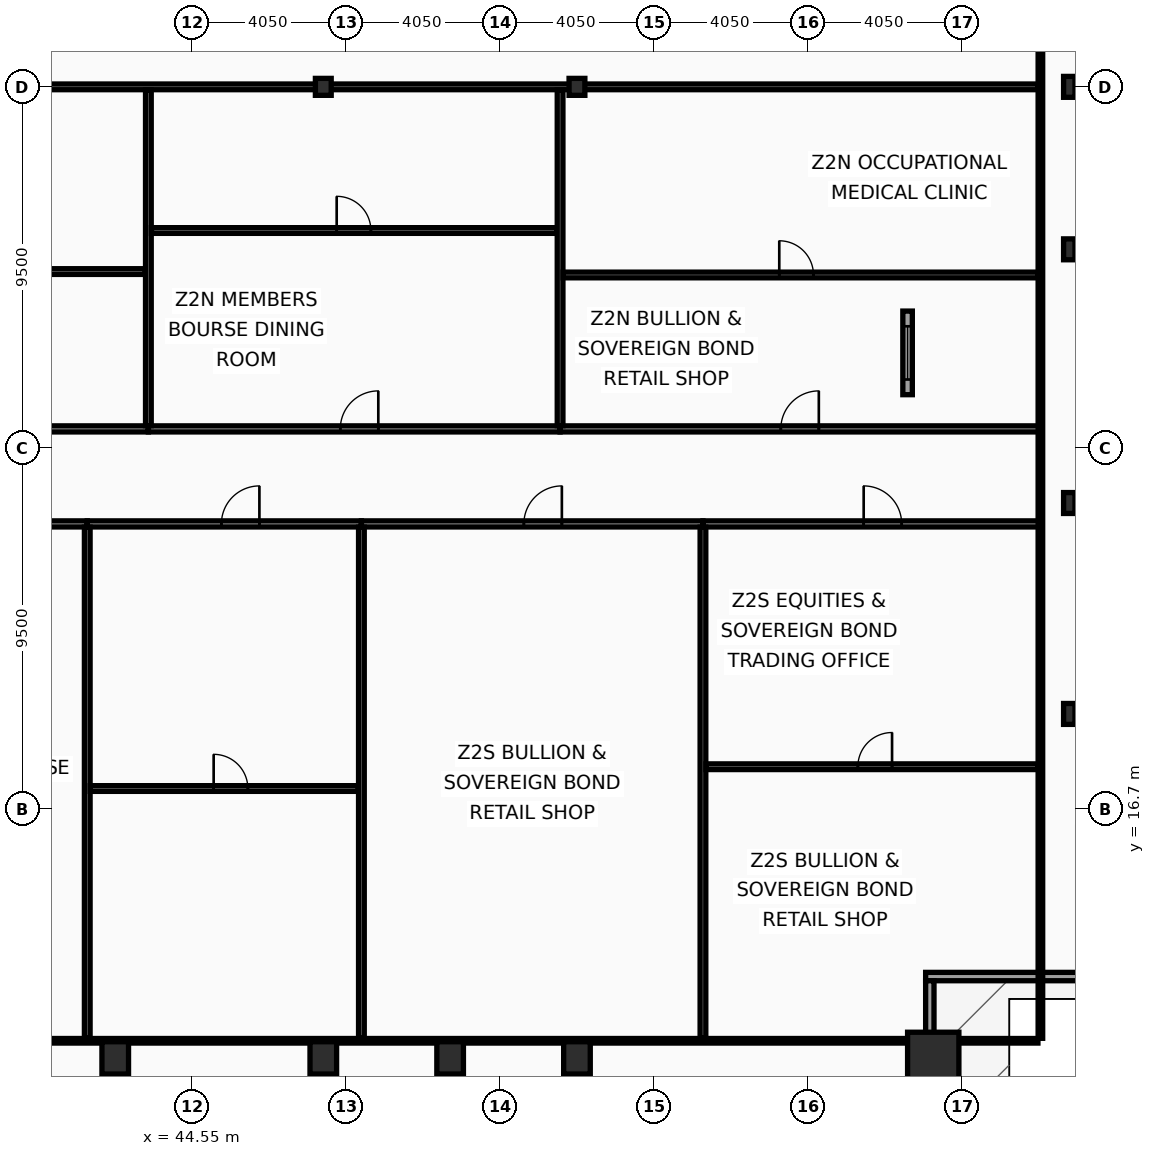
"""IFC4 building model, lengths in metres.
Left out: names, types, materials, properties, quantities, classifications, styles, units other than length and angle.
Written with IfcOpenShell. Run it as: python <this file> out.ifc"""

import sys

from ifc_helpers import new_model, si_unit, direction, frame, frame_2d, origin, origin_2d, place, context, subcontext, project, spatial, rectangle, hollow_rectangle, i_section, extrude, element, fill, save


model = new_model("IFC4")
c1 = context("Model", 3, precision=1e-05, world=origin(), true_north=direction((0.0, 1.0)))
c2 = subcontext(c1, "Body", "Model", "MODEL_VIEW")
j1 = project(units=[si_unit("LENGTHUNIT", "METRE"), si_unit("PLANEANGLEUNIT", "RADIAN")], contexts=[c1])
p1 = place(None, origin())
s1 = spatial("IfcSite", under=j1, at=p1, CompositionType="ELEMENT")
p2 = place(p1, origin())
s2 = spatial("IfcBuilding", under=s1, at=p2, CompositionType="ELEMENT")
p3 = place(p2, frame((0.0, 0.0, 136.2)))
s3 = spatial("IfcBuildingStorey", under=s2, at=p3, CompositionType="ELEMENT", Elevation=136.2)
p4 = place(p3, frame((64.05, 10.15, 0.0), z_axis=(0.0, 0.0, 1.0), x_axis=(1.0, 0.0, 0.0)))
e1 = element("IfcColumn", 1, at=p4, inside=s3, PredefinedType="COLUMN", context=c2, shape_type="SweptSolid", body=[
    extrude(hollow_rectangle(XDim=1.35, YDim=1.35, WallThickness=0.065, at=origin_2d()), origin(), (0.0, 0.0, 1.0), 3.6),
])
for number, where, z_axis, x_axis in (
    (2, (42.525, 10.15, 0.0), (0.0, 0.0, 1.0), (1.0, 0.0, 0.0)),
    (3, (48.0, 10.15, 0.0), (0.0, 0.0, 1.0), (1.0, 0.0, 0.0)),
    (4, (51.337, 10.15, 0.0), (0.0, 0.0, 1.0), (1.0, 0.0, 0.0)),
    (5, (54.675, 10.15, 0.0), (0.0, 0.0, 1.0), (1.0, 0.0, 0.0)),
):
    element("IfcColumn", number, at=place(p3, frame(where, z_axis=z_axis, x_axis=x_axis)), inside=s3, PredefinedType="COLUMN", context=c2, shape_type="SweptSolid", body=[
        extrude(hollow_rectangle(XDim=0.7, YDim=0.85, WallThickness=0.05, at=origin_2d()), origin(), (0.0, 0.0, 1.0), 3.6),
    ])
for number, where, z_axis, x_axis in (
    (6, (67.63, 19.2, 0.0), (0.0, 0.0, 1.0), (1.0, 0.0, 0.0)),
    (7, (67.63, 24.75, 0.0), (0.0, 0.0, 1.0), (1.0, 0.0, 0.0)),
    (8, (67.63, 31.425, 0.0), (0.0, 0.0, 1.0), (1.0, 0.0, 0.0)),
    (9, (67.63, 35.7, 0.0), (0.0, 0.0, 1.0), (1.0, 0.0, 0.0)),
):
    element("IfcColumn", number, at=place(p3, frame(where, z_axis=z_axis, x_axis=x_axis)), inside=s3, PredefinedType="COLUMN", context=c2, shape_type="SweptSolid", body=[
        extrude(i_section(OverallWidth=0.3, OverallDepth=0.55, WebThickness=0.015, FlangeThickness=0.029, at=origin_2d()), origin(), (0.0, 0.0, 1.0), 3.6),
    ])
for number, where, z_axis, x_axis in (
    (10, (48.0, 35.7, 0.0), (0.0, 0.0, 1.0), (1.0, 0.0, 0.0)),
    (11, (54.675, 35.7, 0.0), (0.0, 0.0, 1.0), (1.0, 0.0, 0.0)),
):
    element("IfcColumn", number, at=place(p3, frame(where, z_axis=z_axis, x_axis=x_axis)), inside=s3, PredefinedType="COLUMN", context=c2, shape_type="SweptSolid", body=[
        extrude(i_section(OverallWidth=0.416, OverallDepth=0.446, WebThickness=0.039, FlangeThickness=0.063, at=origin_2d()), origin(), (0.0, 0.0, 1.0), 3.6),
    ])
p5 = place(p3, frame((68.07, 12.29, 0.0), z_axis=(0.0, 0.0, 1.0), x_axis=(-1.0, 0.0, 0.0)))
e12 = element("IfcWall", 12, at=p5, inside=s3, PredefinedType="SOLIDWALL", context=c2, shape_type="SweptSolid", body=[
    extrude(rectangle(XDim=4.22, YDim=0.22, at=frame_2d((2.11, 0.0))), origin(), (0.0, 0.0, 1.0), 2.83),
])
p6 = place(p3, frame((63.96, 12.18, 0.0), z_axis=(0.0, 0.0, 1.0), x_axis=(0.0, -1.0, 0.0)))
e13 = element("IfcWall", 13, at=p6, inside=s3, PredefinedType="SOLIDWALL", context=c2, shape_type="SweptSolid", body=[
    extrude(rectangle(XDim=3.91, YDim=0.22, at=frame_2d((1.955, 0.0))), origin(), (0.0, 0.0, 1.0), 2.83),
])
p7 = place(p3, frame((63.375, 27.6, 0.0), z_axis=(0.0, 0.0, 1.0), x_axis=(0.0, 1.0, 0.0)))
e14 = element("IfcWall", 14, at=p7, inside=s3, PredefinedType="PARAPET", context=c2, shape_type="SweptSolid", body=[
    extrude(rectangle(XDim=2.2, YDim=0.25, at=frame_2d((1.1, 0.0))), origin(), (0.0, 0.0, 1.0), 0.88),
])
p8 = place(p7, frame((0.4, 0.0, 0.16)))
e15 = element("IfcOpeningElement", 15, at=p8, cuts=e14, PredefinedType="OPENING", context=c2, shape_type="SweptSolid", body=[
    extrude(rectangle(XDim=1.4, YDim=0.5, at=frame_2d((0.7, 0.25))), frame((0.0, 0.135, 0.0), z_axis=(0.0, -1.0, 0.0), x_axis=(1.0, 0.0, 0.0)), (0.0, 0.0, 1.0), 0.27),
])
p9 = place(p3, frame((34.886, 24.2, 0.0), z_axis=(0.0, 0.0, 1.0), x_axis=(1.0, 0.0, 0.0)))
e16 = element("IfcWall", 16, at=p9, inside=s3, PredefinedType="PARTITIONING", context=c2, shape_type="SweptSolid", body=[
    extrude(rectangle(XDim=6.902, YDim=0.16, at=frame_2d((3.451, 0.0))), origin(), (0.0, 0.0, 1.0), 3.44),
])
p10 = place(p9, frame((3.399, 0.0, 0.0)))
e17 = element("IfcOpeningElement", 17, at=p10, cuts=e16, PredefinedType="OPENING", context=c2, shape_type="SweptSolid", body=[
    extrude(rectangle(XDim=1.0, YDim=2.05, at=frame_2d((0.5, 1.025))), frame((0.0, 0.09, 0.0), z_axis=(0.0, -1.0, 0.0), x_axis=(1.0, 0.0, 0.0)), (0.0, 0.0, 1.0), 0.18),
])
p11 = place(p3, frame((41.789, 24.2, 0.0), z_axis=(0.0, 0.0, 1.0), x_axis=(1.0, 0.0, 0.0)))
e18 = element("IfcWall", 18, at=p11, inside=s3, PredefinedType="PARTITIONING", context=c2, shape_type="SweptSolid", body=[
    extrude(rectangle(XDim=7.214, YDim=0.16, at=frame_2d((3.607, 0.0))), origin(), (0.0, 0.0, 1.0), 2.73),
])
p12 = place(p11, frame((3.53, 0.0, 0.0)))
e19 = element("IfcOpeningElement", 19, at=p12, cuts=e18, PredefinedType="OPENING", context=c2, shape_type="SweptSolid", body=[
    extrude(rectangle(XDim=1.0, YDim=2.05, at=frame_2d((0.5, 1.025))), frame((0.0, 0.09, 0.0), z_axis=(0.0, -1.0, 0.0), x_axis=(1.0, 0.0, 0.0)), (0.0, 0.0, 1.0), 0.18),
])
p13 = place(p3, frame((41.789, 10.665, 0.0), z_axis=(0.0, 0.0, 1.0), x_axis=(0.0, 1.0, 0.0)))
e20 = element("IfcWall", 20, at=p13, inside=s3, PredefinedType="PARTITIONING", context=c2, shape_type="SweptSolid", body=[
    extrude(rectangle(XDim=13.45, YDim=0.15, at=frame_2d((6.725, 0.0))), origin(), (0.0, 0.0, 1.0), 2.93),
])
p14 = place(p3, frame((41.869, 17.238, 0.0), z_axis=(0.0, 0.0, 1.0), x_axis=(1.0, 0.0, 0.0)))
e21 = element("IfcWall", 21, at=p14, inside=s3, PredefinedType="PARTITIONING", context=c2, shape_type="SweptSolid", body=[
    extrude(rectangle(XDim=7.054, YDim=0.15, at=frame_2d((3.527, 0.0))), origin(), (0.0, 0.0, 1.0), 2.73),
])
p15 = place(p14, frame((3.246, 0.0, 0.0)))
e22 = element("IfcOpeningElement", 22, at=p15, cuts=e21, PredefinedType="OPENING", context=c2, shape_type="SweptSolid", body=[
    extrude(rectangle(XDim=0.9, YDim=2.05, at=frame_2d((0.45, 1.025))), frame((0.0, 0.085, 0.0), z_axis=(0.0, -1.0, 0.0), x_axis=(1.0, 0.0, 0.0)), (0.0, 0.0, 1.0), 0.17),
])
p16 = place(p3, frame((49.003, 24.2, 0.0), z_axis=(0.0, 0.0, 1.0), x_axis=(1.0, 0.0, 0.0)))
e23 = element("IfcWall", 23, at=p16, inside=s3, PredefinedType="PARTITIONING", context=c2, shape_type="SweptSolid", body=[
    extrude(rectangle(XDim=8.988, YDim=0.16, at=frame_2d((4.494, 0.0))), origin(), (0.0, 0.0, 1.0), 2.73),
])
p17 = place(p16, frame((4.275, 0.0, 0.0)))
e24 = element("IfcOpeningElement", 24, at=p17, cuts=e23, PredefinedType="OPENING", context=c2, shape_type="SweptSolid", body=[
    extrude(rectangle(XDim=1.0, YDim=2.05, at=frame_2d((0.5, 1.025))), frame((0.0, 0.09, 0.0), z_axis=(0.0, -1.0, 0.0), x_axis=(1.0, 0.0, 0.0)), (0.0, 0.0, 1.0), 0.18),
])
p18 = place(p3, frame((49.003, 10.665, 0.0), z_axis=(0.0, 0.0, 1.0), x_axis=(0.0, 1.0, 0.0)))
e25 = element("IfcWall", 25, at=p18, inside=s3, PredefinedType="PARTITIONING", context=c2, shape_type="SweptSolid", body=[
    extrude(rectangle(XDim=13.45, YDim=0.15, at=frame_2d((6.725, 0.0))), origin(), (0.0, 0.0, 1.0), 2.93),
])
p19 = place(p3, frame((57.99, 24.2, 0.0), z_axis=(0.0, 0.0, 1.0), x_axis=(1.0, 0.0, 0.0)))
e26 = element("IfcWall", 26, at=p19, inside=s3, PredefinedType="PARTITIONING", context=c2, shape_type="SweptSolid", body=[
    extrude(rectangle(XDim=8.88, YDim=0.16, at=frame_2d((4.44, 0.0))), origin(), (0.0, 0.0, 1.0), 3.44),
])
p20 = place(p19, frame((4.229, 0.0, 0.0)))
e27 = element("IfcOpeningElement", 27, at=p20, cuts=e26, PredefinedType="OPENING", context=c2, shape_type="SweptSolid", body=[
    extrude(rectangle(XDim=1.0, YDim=2.05, at=frame_2d((0.5, 1.025))), frame((0.0, 0.09, 0.0), z_axis=(0.0, -1.0, 0.0), x_axis=(1.0, 0.0, 0.0)), (0.0, 0.0, 1.0), 0.18),
])
p21 = place(p3, frame((57.99, 10.665, 0.0), z_axis=(0.0, 0.0, 1.0), x_axis=(0.0, 1.0, 0.0)))
e28 = element("IfcWall", 28, at=p21, inside=s3, PredefinedType="PARTITIONING", context=c2, shape_type="SweptSolid", body=[
    extrude(rectangle(XDim=13.45, YDim=0.15, at=frame_2d((6.725, 0.0))), origin(), (0.0, 0.0, 1.0), 2.73),
])
p22 = place(p3, frame((58.07, 17.811, 0.0), z_axis=(0.0, 0.0, 1.0), x_axis=(1.0, 0.0, 0.0)))
e29 = element("IfcWall", 29, at=p22, inside=s3, PredefinedType="PARTITIONING", context=c2, shape_type="SweptSolid", body=[
    extrude(rectangle(XDim=8.735, YDim=0.15, at=frame_2d((4.367, 0.0))), origin(), (0.0, 0.0, 1.0), 2.83),
])
p23 = place(p22, frame((3.996, 0.0, 0.0)))
e30 = element("IfcOpeningElement", 30, at=p23, cuts=e29, PredefinedType="OPENING", context=c2, shape_type="SweptSolid", body=[
    extrude(rectangle(XDim=0.9, YDim=2.05, at=frame_2d((0.45, 1.025))), frame((0.0, 0.085, 0.0), z_axis=(0.0, -1.0, 0.0), x_axis=(1.0, 0.0, 0.0)), (0.0, 0.0, 1.0), 0.17),
])
p24 = place(p3, frame((21.81, 35.7, 0.0), z_axis=(0.0, 0.0, 1.0), x_axis=(1.0, 0.0, 0.0)))
e31 = element("IfcWall", 31, at=p24, inside=s3, PredefinedType="PARTITIONING", context=c2, shape_type="SweptSolid", body=[
    extrude(rectangle(XDim=44.995, YDim=0.15, at=frame_2d((22.498, 0.0))), origin(), (0.0, 0.0, 1.0), 2.73),
])
p25 = place(p3, frame((33.466, 26.7, 0.0), z_axis=(0.0, 0.0, 1.0), x_axis=(1.0, 0.0, 0.0)))
e32 = element("IfcWall", 32, at=p25, inside=s3, PredefinedType="PARTITIONING", context=c2, shape_type="SweptSolid", body=[
    extrude(rectangle(XDim=9.931, YDim=0.16, at=frame_2d((4.965, 0.0))), origin(), (0.0, 0.0, 1.0), 2.73),
])
p26 = place(p25, frame((4.671, 0.0, 0.0)))
e33 = element("IfcOpeningElement", 33, at=p26, cuts=e32, PredefinedType="OPENING", context=c2, shape_type="SweptSolid", body=[
    extrude(rectangle(XDim=1.0, YDim=2.05, at=frame_2d((0.5, 1.025))), frame((0.0, 0.09, 0.0), z_axis=(0.0, -1.0, 0.0), x_axis=(1.0, 0.0, 0.0)), (0.0, 0.0, 1.0), 0.18),
])
p27 = place(p3, frame((33.546, 30.84, 0.0), z_axis=(0.0, 0.0, 1.0), x_axis=(1.0, 0.0, 0.0)))
e34 = element("IfcWall", 34, at=p27, inside=s3, PredefinedType="PARTITIONING", context=c2, shape_type="SweptSolid", body=[
    extrude(rectangle(XDim=9.771, YDim=0.15, at=frame_2d((4.885, 0.0))), origin(), (0.0, 0.0, 1.0), 2.73),
])
p28 = place(p27, frame((4.469, 0.0, 0.0)))
e35 = element("IfcOpeningElement", 35, at=p28, cuts=e34, PredefinedType="OPENING", context=c2, shape_type="SweptSolid", body=[
    extrude(rectangle(XDim=0.9, YDim=2.05, at=frame_2d((0.45, 1.025))), frame((0.0, 0.085, 0.0), z_axis=(0.0, -1.0, 0.0), x_axis=(1.0, 0.0, 0.0)), (0.0, 0.0, 1.0), 0.17),
])
p29 = place(p3, frame((43.397, 26.7, 0.0), z_axis=(0.0, 0.0, 1.0), x_axis=(1.0, 0.0, 0.0)))
e36 = element("IfcWall", 36, at=p29, inside=s3, PredefinedType="PARTITIONING", context=c2, shape_type="SweptSolid", body=[
    extrude(rectangle(XDim=10.833, YDim=0.16, at=frame_2d((5.417, 0.0))), origin(), (0.0, 0.0, 1.0), 2.73),
])
p30 = place(p29, frame((5.05, 0.0, 0.0)))
e37 = element("IfcOpeningElement", 37, at=p30, cuts=e36, PredefinedType="OPENING", context=c2, shape_type="SweptSolid", body=[
    extrude(rectangle(XDim=1.0, YDim=2.05, at=frame_2d((0.5, 1.025))), frame((0.0, 0.09, 0.0), z_axis=(0.0, -1.0, 0.0), x_axis=(1.0, 0.0, 0.0)), (0.0, 0.0, 1.0), 0.18),
])
p31 = place(p3, frame((43.397, 26.785, 0.0), z_axis=(0.0, 0.0, 1.0), x_axis=(0.0, 1.0, 0.0)))
e38 = element("IfcWall", 38, at=p31, inside=s3, PredefinedType="PARTITIONING", context=c2, shape_type="SweptSolid", body=[
    extrude(rectangle(XDim=8.835, YDim=0.15, at=frame_2d((4.417, 0.0))), origin(), (0.0, 0.0, 1.0), 2.93),
])
p32 = place(p3, frame((43.477, 31.92, 0.0), z_axis=(0.0, 0.0, 1.0), x_axis=(1.0, 0.0, 0.0)))
e39 = element("IfcWall", 39, at=p32, inside=s3, PredefinedType="PARTITIONING", context=c2, shape_type="SweptSolid", body=[
    extrude(rectangle(XDim=10.674, YDim=0.15, at=frame_2d((5.337, 0.0))), origin(), (0.0, 0.0, 1.0), 2.73),
])
p33 = place(p32, frame((4.875, 0.0, 0.0)))
e40 = element("IfcOpeningElement", 40, at=p33, cuts=e39, PredefinedType="OPENING", context=c2, shape_type="SweptSolid", body=[
    extrude(rectangle(XDim=0.9, YDim=2.05, at=frame_2d((0.45, 1.025))), frame((0.0, 0.085, 0.0), z_axis=(0.0, -1.0, 0.0), x_axis=(1.0, 0.0, 0.0)), (0.0, 0.0, 1.0), 0.17),
])
p34 = place(p3, frame((54.231, 26.7, 0.0), z_axis=(0.0, 0.0, 1.0), x_axis=(1.0, 0.0, 0.0)))
e41 = element("IfcWall", 41, at=p34, inside=s3, PredefinedType="PARTITIONING", context=c2, shape_type="SweptSolid", body=[
    extrude(rectangle(XDim=12.639, YDim=0.16, at=frame_2d((6.32, 0.0))), origin(), (0.0, 0.0, 1.0), 2.73),
])
p35 = place(p34, frame((5.809, 0.0, 0.0)))
e42 = element("IfcOpeningElement", 42, at=p35, cuts=e41, PredefinedType="OPENING", context=c2, shape_type="SweptSolid", body=[
    extrude(rectangle(XDim=1.0, YDim=2.05, at=frame_2d((0.5, 1.025))), frame((0.0, 0.09, 0.0), z_axis=(0.0, -1.0, 0.0), x_axis=(1.0, 0.0, 0.0)), (0.0, 0.0, 1.0), 0.18),
])
p36 = place(p3, frame((54.231, 26.785, 0.0), z_axis=(0.0, 0.0, 1.0), x_axis=(0.0, 1.0, 0.0)))
e43 = element("IfcWall", 43, at=p36, inside=s3, PredefinedType="PARTITIONING", context=c2, shape_type="SweptSolid", body=[
    extrude(rectangle(XDim=8.835, YDim=0.15, at=frame_2d((4.417, 0.0))), origin(), (0.0, 0.0, 1.0), 2.73),
])
p37 = place(p3, frame((54.311, 30.75, 0.0), z_axis=(0.0, 0.0, 1.0), x_axis=(1.0, 0.0, 0.0)))
e44 = element("IfcWall", 44, at=p37, inside=s3, PredefinedType="PARTITIONING", context=c2, shape_type="SweptSolid", body=[
    extrude(rectangle(XDim=12.494, YDim=0.15, at=frame_2d((6.247, 0.0))), origin(), (0.0, 0.0, 1.0), 2.73),
])
p38 = place(p37, frame((5.688, 0.0, 0.0)))
e45 = element("IfcOpeningElement", 45, at=p38, cuts=e44, PredefinedType="OPENING", context=c2, shape_type="SweptSolid", body=[
    extrude(rectangle(XDim=0.9, YDim=2.05, at=frame_2d((0.45, 1.025))), frame((0.0, 0.085, 0.0), z_axis=(0.0, -1.0, 0.0), x_axis=(1.0, 0.0, 0.0)), (0.0, 0.0, 1.0), 0.17),
])
p39 = place(p3, frame((66.87, 10.665, 0.0), z_axis=(0.0, 0.0, 1.0), x_axis=(0.0, 1.0, 0.0)))
e46 = element("IfcWall", 46, at=p39, inside=s3, PredefinedType="PARTITIONING", context=c2, shape_type="SweptSolid", body=[
    extrude(rectangle(XDim=42.11, YDim=0.12, at=frame_2d((21.055, 0.0))), origin(), (0.0, 0.0, 1.0), 2.73),
])
p40 = place(p3, frame((6.095, 10.6, 0.0), z_axis=(0.0, 0.0, 1.0), x_axis=(1.0, 0.0, 0.0)))
e47 = element("IfcWall", 47, at=p40, inside=s3, PredefinedType="PARTITIONING", context=c2, shape_type="SweptSolid", body=[
    extrude(rectangle(XDim=60.71, YDim=0.12, at=frame_2d((30.355, 0.0))), origin(), (0.0, 0.0, 1.0), 2.73),
])
p41 = place(p8, origin())
e48 = element("IfcWindow", 48, at=p41, inside=s3, PartitioningType="SINGLE_PANEL", PredefinedType="SKYLIGHT", context=c2, shape_type="SweptSolid", body=[
    extrude(rectangle(XDim=1.4, YDim=0.5, at=frame_2d((0.7, 0.25))), frame((0.0, 0.03, 0.0), z_axis=(0.0, -1.0, 0.0), x_axis=(1.0, 0.0, 0.0)), (0.0, 0.0, 1.0), 0.06),
])
fill(e15, e48)
p42 = place(p12, origin())
e49 = element("IfcDoor", 49, at=p42, inside=s3, OperationType="SINGLE_SWING_RIGHT", PredefinedType="DOOR", context=c2, shape_type="SweptSolid", body=[
    extrude(rectangle(XDim=1.0, YDim=2.05, at=frame_2d((0.5, 1.025))), frame((0.0, 0.025, 0.0), z_axis=(0.0, -1.0, 0.0), x_axis=(1.0, 0.0, 0.0)), (0.0, 0.0, 1.0), 0.05),
])
fill(e19, e49)
p43 = place(p15, origin())
e50 = element("IfcDoor", 50, at=p43, inside=s3, OperationType="SINGLE_SWING_LEFT", PredefinedType="DOOR", context=c2, shape_type="SweptSolid", body=[
    extrude(rectangle(XDim=0.9, YDim=2.05, at=frame_2d((0.45, 1.025))), frame((0.0, 0.025, 0.0), z_axis=(0.0, -1.0, 0.0), x_axis=(1.0, 0.0, 0.0)), (0.0, 0.0, 1.0), 0.05),
])
fill(e22, e50)
p44 = place(p17, origin())
e51 = element("IfcDoor", 51, at=p44, inside=s3, OperationType="SINGLE_SWING_RIGHT", PredefinedType="DOOR", context=c2, shape_type="SweptSolid", body=[
    extrude(rectangle(XDim=1.0, YDim=2.05, at=frame_2d((0.5, 1.025))), frame((0.0, 0.025, 0.0), z_axis=(0.0, -1.0, 0.0), x_axis=(1.0, 0.0, 0.0)), (0.0, 0.0, 1.0), 0.05),
])
fill(e24, e51)
p45 = place(p20, origin())
e52 = element("IfcDoor", 52, at=p45, inside=s3, OperationType="SINGLE_SWING_LEFT", PredefinedType="DOOR", context=c2, shape_type="SweptSolid", body=[
    extrude(rectangle(XDim=1.0, YDim=2.05, at=frame_2d((0.5, 1.025))), frame((0.0, 0.025, 0.0), z_axis=(0.0, -1.0, 0.0), x_axis=(1.0, 0.0, 0.0)), (0.0, 0.0, 1.0), 0.05),
])
fill(e27, e52)
p46 = place(p23, origin())
e53 = element("IfcDoor", 53, at=p46, inside=s3, OperationType="SINGLE_SWING_RIGHT", PredefinedType="DOOR", context=c2, shape_type="SweptSolid", body=[
    extrude(rectangle(XDim=0.9, YDim=2.05, at=frame_2d((0.45, 1.025))), frame((0.0, 0.025, 0.0), z_axis=(0.0, -1.0, 0.0), x_axis=(1.0, 0.0, 0.0)), (0.0, 0.0, 1.0), 0.05),
])
fill(e30, e53)
p47 = place(p30, origin())
e54 = element("IfcDoor", 54, at=p47, inside=s3, OperationType="SINGLE_SWING_RIGHT", PredefinedType="DOOR", context=c2, shape_type="SweptSolid", body=[
    extrude(rectangle(XDim=1.0, YDim=2.05, at=frame_2d((0.5, 1.025))), frame((0.0, 0.025, 0.0), z_axis=(0.0, -1.0, 0.0), x_axis=(1.0, 0.0, 0.0)), (0.0, 0.0, 1.0), 0.05),
])
fill(e37, e54)
p48 = place(p33, origin())
e55 = element("IfcDoor", 55, at=p48, inside=s3, OperationType="SINGLE_SWING_LEFT", PredefinedType="DOOR", context=c2, shape_type="SweptSolid", body=[
    extrude(rectangle(XDim=0.9, YDim=2.05, at=frame_2d((0.45, 1.025))), frame((0.0, 0.025, 0.0), z_axis=(0.0, -1.0, 0.0), x_axis=(1.0, 0.0, 0.0)), (0.0, 0.0, 1.0), 0.05),
])
fill(e40, e55)
p49 = place(p35, origin())
e56 = element("IfcDoor", 56, at=p49, inside=s3, OperationType="SINGLE_SWING_RIGHT", PredefinedType="DOOR", context=c2, shape_type="SweptSolid", body=[
    extrude(rectangle(XDim=1.0, YDim=2.05, at=frame_2d((0.5, 1.025))), frame((0.0, 0.025, 0.0), z_axis=(0.0, -1.0, 0.0), x_axis=(1.0, 0.0, 0.0)), (0.0, 0.0, 1.0), 0.05),
])
fill(e42, e56)
p50 = place(p38, origin())
e57 = element("IfcDoor", 57, at=p50, inside=s3, OperationType="SINGLE_SWING_LEFT", PredefinedType="DOOR", context=c2, shape_type="SweptSolid", body=[
    extrude(rectangle(XDim=0.9, YDim=2.05, at=frame_2d((0.45, 1.025))), frame((0.0, 0.025, 0.0), z_axis=(0.0, -1.0, 0.0), x_axis=(1.0, 0.0, 0.0)), (0.0, 0.0, 1.0), 0.05),
])
fill(e45, e57)
save(model, sys.argv[1])
